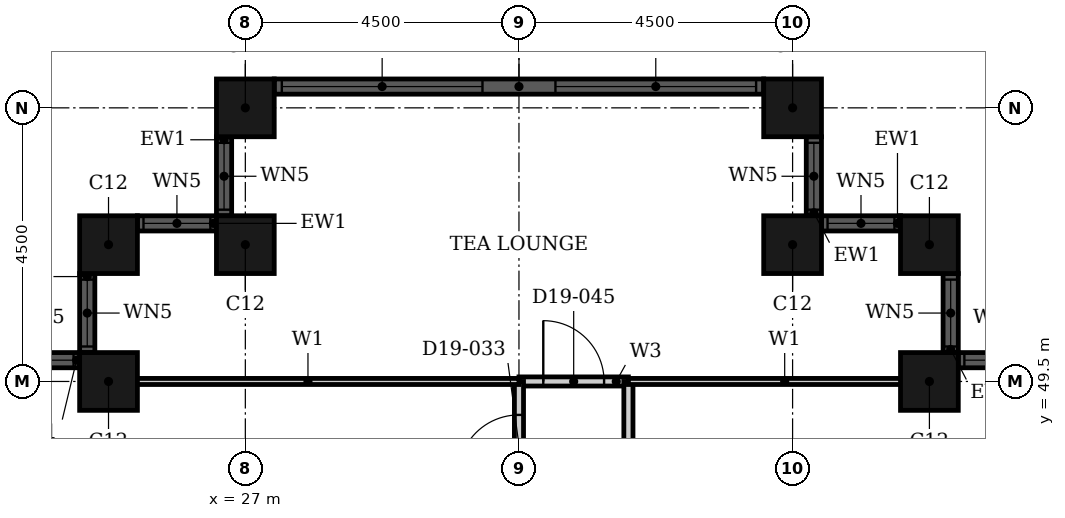
"""IFC4 building model, lengths in metres.
Left out: names, types, materials, properties, quantities, classifications, styles, units other than length and angle.
Written with IfcOpenShell. Run it as: python <this file> out.ifc"""

import sys

from ifc_helpers import new_model, si_unit, direction, frame, frame_2d, origin, origin_2d, place, context, subcontext, project, spatial, rectangle, hollow_rectangle, extrude, element, fill, save


model = new_model("IFC4")
c1 = context("Model", 3, precision=1e-05, world=origin(), true_north=direction((0.0, 1.0)))
c2 = subcontext(c1, "Body", "Model", "MODEL_VIEW")
j1 = project(units=[si_unit("LENGTHUNIT", "METRE"), si_unit("PLANEANGLEUNIT", "RADIAN")], contexts=[c1])
p1 = place(None, origin())
s1 = spatial("IfcSite", under=j1, at=p1, CompositionType="ELEMENT")
p2 = place(p1, origin())
s2 = spatial("IfcBuilding", under=s1, at=p2, CompositionType="ELEMENT")
p3 = place(p2, frame((0.0, 0.0, 81.6)))
s3 = spatial("IfcBuildingStorey", under=s2, at=p3, CompositionType="ELEMENT", Elevation=81.6)
for number, where, z_axis, x_axis in (
    (1, (38.25, 49.5, 0.0), (0.0, 0.0, 1.0), (1.0, 0.0, 0.0)),
    (2, (38.25, 51.75, 0.0), (0.0, 0.0, 1.0), (1.0, 0.0, 0.0)),
    (3, (36.0, 51.75, 0.0), (0.0, 0.0, 1.0), (1.0, 0.0, 0.0)),
    (4, (36.0, 54.0, 0.0), (0.0, 0.0, 1.0), (1.0, 0.0, 0.0)),
    (5, (27.0, 54.0, 0.0), (0.0, 0.0, 1.0), (1.0, 0.0, 0.0)),
    (6, (27.0, 51.75, 0.0), (0.0, 0.0, 1.0), (1.0, 0.0, 0.0)),
    (7, (24.75, 51.75, 0.0), (0.0, 0.0, 1.0), (1.0, 0.0, 0.0)),
    (8, (24.75, 49.5, 0.0), (0.0, 0.0, 1.0), (1.0, 0.0, 0.0)),
):
    element("IfcColumn", number, at=place(p3, frame(where, z_axis=z_axis, x_axis=x_axis)), inside=s3, PredefinedType="COLUMN", context=c2, shape_type="SweptSolid", body=[
        extrude(hollow_rectangle(XDim=0.95, YDim=0.95, WallThickness=0.03, at=origin_2d()), origin(), (0.0, 0.0, 1.0), 3.6),
    ])
p4 = place(p3, frame((40.025, 49.85, 0.0), z_axis=(0.0, 0.0, 1.0), x_axis=(-1.0, 0.0, 0.0)))
e9 = element("IfcWall", 9, at=p4, inside=s3, PredefinedType="SOLIDWALL", context=c2, shape_type="SweptSolid", body=[
    extrude(rectangle(XDim=1.3, YDim=0.25, at=frame_2d((0.65, 0.0))), origin(), (0.0, 0.0, 1.0), 3.6),
])
p5 = place(p4, frame((0.1, 0.0, 0.9)))
e10 = element("IfcOpeningElement", 10, at=p5, cuts=e9, PredefinedType="OPENING", context=c2, shape_type="SweptSolid", body=[
    extrude(rectangle(XDim=1.1, YDim=2.08, at=frame_2d((0.55, 1.04))), frame((0.0, 0.135, 0.0), z_axis=(0.0, -1.0, 0.0), x_axis=(1.0, 0.0, 0.0)), (0.0, 0.0, 1.0), 0.27),
])
p6 = place(p3, frame((38.6, 49.975, 0.0), z_axis=(0.0, 0.0, 1.0), x_axis=(0.0, 1.0, 0.0)))
e11 = element("IfcWall", 11, at=p6, inside=s3, PredefinedType="SOLIDWALL", context=c2, shape_type="SweptSolid", body=[
    extrude(rectangle(XDim=1.3, YDim=0.25, at=frame_2d((0.65, 0.0))), origin(), (0.0, 0.0, 1.0), 3.6),
])
p7 = place(p6, frame((0.1, 0.0, 0.9)))
e12 = element("IfcOpeningElement", 12, at=p7, cuts=e11, PredefinedType="OPENING", context=c2, shape_type="SweptSolid", body=[
    extrude(rectangle(XDim=1.1, YDim=2.08, at=frame_2d((0.55, 1.04))), frame((0.0, 0.135, 0.0), z_axis=(0.0, -1.0, 0.0), x_axis=(1.0, 0.0, 0.0)), (0.0, 0.0, 1.0), 0.27),
])
p8 = place(p3, frame((37.775, 52.1, 0.0), z_axis=(0.0, 0.0, 1.0), x_axis=(-1.0, 0.0, 0.0)))
e13 = element("IfcWall", 13, at=p8, inside=s3, PredefinedType="SOLIDWALL", context=c2, shape_type="SweptSolid", body=[
    extrude(rectangle(XDim=1.3, YDim=0.25, at=frame_2d((0.65, 0.0))), origin(), (0.0, 0.0, 1.0), 3.6),
])
p9 = place(p8, frame((0.1, 0.0, 0.9)))
e14 = element("IfcOpeningElement", 14, at=p9, cuts=e13, PredefinedType="OPENING", context=c2, shape_type="SweptSolid", body=[
    extrude(rectangle(XDim=1.1, YDim=2.08, at=frame_2d((0.55, 1.04))), frame((0.0, 0.135, 0.0), z_axis=(0.0, -1.0, 0.0), x_axis=(1.0, 0.0, 0.0)), (0.0, 0.0, 1.0), 0.27),
])
p10 = place(p3, frame((36.35, 52.225, 0.0), z_axis=(0.0, 0.0, 1.0), x_axis=(0.0, 1.0, 0.0)))
e15 = element("IfcWall", 15, at=p10, inside=s3, PredefinedType="SOLIDWALL", context=c2, shape_type="SweptSolid", body=[
    extrude(rectangle(XDim=1.3, YDim=0.25, at=frame_2d((0.65, 0.0))), origin(), (0.0, 0.0, 1.0), 3.6),
])
p11 = place(p10, frame((0.1, 0.0, 0.9)))
e16 = element("IfcOpeningElement", 16, at=p11, cuts=e15, PredefinedType="OPENING", context=c2, shape_type="SweptSolid", body=[
    extrude(rectangle(XDim=1.1, YDim=2.08, at=frame_2d((0.55, 1.04))), frame((0.0, 0.135, 0.0), z_axis=(0.0, -1.0, 0.0), x_axis=(1.0, 0.0, 0.0)), (0.0, 0.0, 1.0), 0.27),
])
p12 = place(p3, frame((35.525, 54.35, 0.0), z_axis=(0.0, 0.0, 1.0), x_axis=(-1.0, 0.0, 0.0)))
e17 = element("IfcWall", 17, at=p12, inside=s3, PredefinedType="SOLIDWALL", context=c2, shape_type="SweptSolid", body=[
    extrude(rectangle(XDim=8.05, YDim=0.25, at=frame_2d((4.025, 0.0))), origin(), (0.0, 0.0, 1.0), 3.6),
])
p13 = place(p12, frame((0.125, 0.0, 0.9)))
e18 = element("IfcOpeningElement", 18, at=p13, cuts=e17, PredefinedType="OPENING", context=c2, shape_type="SweptSolid", body=[
    extrude(rectangle(XDim=3.3, YDim=2.08, at=frame_2d((1.65, 1.04))), frame((0.0, 0.135, 0.0), z_axis=(0.0, -1.0, 0.0), x_axis=(1.0, 0.0, 0.0)), (0.0, 0.0, 1.0), 0.27),
])
p14 = place(p12, frame((4.625, 0.0, 0.9)))
e19 = element("IfcOpeningElement", 19, at=p14, cuts=e17, PredefinedType="OPENING", context=c2, shape_type="SweptSolid", body=[
    extrude(rectangle(XDim=3.3, YDim=2.08, at=frame_2d((1.65, 1.04))), frame((0.0, 0.135, 0.0), z_axis=(0.0, -1.0, 0.0), x_axis=(1.0, 0.0, 0.0)), (0.0, 0.0, 1.0), 0.27),
])
p15 = place(p3, frame((26.65, 53.525, 0.0), z_axis=(0.0, 0.0, 1.0), x_axis=(0.0, -1.0, 0.0)))
e20 = element("IfcWall", 20, at=p15, inside=s3, PredefinedType="SOLIDWALL", context=c2, shape_type="SweptSolid", body=[
    extrude(rectangle(XDim=1.3, YDim=0.25, at=frame_2d((0.65, 0.0))), origin(), (0.0, 0.0, 1.0), 3.6),
])
p16 = place(p15, frame((0.1, 0.0, 0.9)))
e21 = element("IfcOpeningElement", 21, at=p16, cuts=e20, PredefinedType="OPENING", context=c2, shape_type="SweptSolid", body=[
    extrude(rectangle(XDim=1.1, YDim=2.08, at=frame_2d((0.55, 1.04))), frame((0.0, 0.135, 0.0), z_axis=(0.0, -1.0, 0.0), x_axis=(1.0, 0.0, 0.0)), (0.0, 0.0, 1.0), 0.27),
])
p17 = place(p3, frame((26.525, 52.1, 0.0), z_axis=(0.0, 0.0, 1.0), x_axis=(-1.0, 0.0, 0.0)))
e22 = element("IfcWall", 22, at=p17, inside=s3, PredefinedType="SOLIDWALL", context=c2, shape_type="SweptSolid", body=[
    extrude(rectangle(XDim=1.3, YDim=0.25, at=frame_2d((0.65, 0.0))), origin(), (0.0, 0.0, 1.0), 3.6),
])
p18 = place(p17, frame((0.1, 0.0, 0.9)))
e23 = element("IfcOpeningElement", 23, at=p18, cuts=e22, PredefinedType="OPENING", context=c2, shape_type="SweptSolid", body=[
    extrude(rectangle(XDim=1.1, YDim=2.08, at=frame_2d((0.55, 1.04))), frame((0.0, 0.135, 0.0), z_axis=(0.0, -1.0, 0.0), x_axis=(1.0, 0.0, 0.0)), (0.0, 0.0, 1.0), 0.27),
])
p19 = place(p3, frame((24.4, 51.275, 0.0), z_axis=(0.0, 0.0, 1.0), x_axis=(0.0, -1.0, 0.0)))
e24 = element("IfcWall", 24, at=p19, inside=s3, PredefinedType="SOLIDWALL", context=c2, shape_type="SweptSolid", body=[
    extrude(rectangle(XDim=1.3, YDim=0.25, at=frame_2d((0.65, 0.0))), origin(), (0.0, 0.0, 1.0), 3.6),
])
p20 = place(p19, frame((0.1, 0.0, 0.9)))
e25 = element("IfcOpeningElement", 25, at=p20, cuts=e24, PredefinedType="OPENING", context=c2, shape_type="SweptSolid", body=[
    extrude(rectangle(XDim=1.1, YDim=2.08, at=frame_2d((0.55, 1.04))), frame((0.0, 0.135, 0.0), z_axis=(0.0, -1.0, 0.0), x_axis=(1.0, 0.0, 0.0)), (0.0, 0.0, 1.0), 0.27),
])
p21 = place(p3, frame((24.275, 49.85, 0.0), z_axis=(0.0, 0.0, 1.0), x_axis=(-1.0, 0.0, 0.0)))
e26 = element("IfcWall", 26, at=p21, inside=s3, PredefinedType="SOLIDWALL", context=c2, shape_type="SweptSolid", body=[
    extrude(rectangle(XDim=1.3, YDim=0.25, at=frame_2d((0.65, 0.0))), origin(), (0.0, 0.0, 1.0), 3.6),
])
p22 = place(p21, frame((0.1, 0.0, 0.9)))
e27 = element("IfcOpeningElement", 27, at=p22, cuts=e26, PredefinedType="OPENING", context=c2, shape_type="SweptSolid", body=[
    extrude(rectangle(XDim=1.1, YDim=2.08, at=frame_2d((0.55, 1.04))), frame((0.0, 0.135, 0.0), z_axis=(0.0, -1.0, 0.0), x_axis=(1.0, 0.0, 0.0)), (0.0, 0.0, 1.0), 0.27),
])
p23 = place(p3, frame((31.5, 49.5, 0.0), z_axis=(0.0, 0.0, 1.0), x_axis=(1.0, 0.0, 0.0)))
e28 = element("IfcWall", 28, at=p23, inside=s3, PredefinedType="PARTITIONING", context=c2, shape_type="SweptSolid", body=[
    extrude(rectangle(XDim=1.8, YDim=0.15, at=frame_2d((0.9, 0.0))), origin(), (0.0, 0.0, 1.0), 3.3),
])
p24 = place(p23, frame((0.4, 0.0, 0.0)))
e29 = element("IfcOpeningElement", 29, at=p24, cuts=e28, PredefinedType="OPENING", context=c2, shape_type="SweptSolid", body=[
    extrude(rectangle(XDim=1.0, YDim=2.1, at=frame_2d((0.5, 1.05))), frame((0.0, 0.085, 0.0), z_axis=(0.0, -1.0, 0.0), x_axis=(1.0, 0.0, 0.0)), (0.0, 0.0, 1.0), 0.17),
])
p25 = place(p3, frame((31.5, 33.3, 0.0), z_axis=(0.0, 0.0, 1.0), x_axis=(0.0, 1.0, 0.0)))
e30 = element("IfcWall", 30, at=p25, inside=s3, PredefinedType="PARTITIONING", context=c2, shape_type="SweptSolid", body=[
    extrude(rectangle(XDim=16.2, YDim=0.15, at=frame_2d((8.1, 0.0))), origin(), (0.0, 0.0, 1.0), 2.58),
])
p26 = place(p25, frame((10.15, 0.0, 0.0)))
e31 = element("IfcOpeningElement", 31, at=p26, cuts=e30, PredefinedType="OPENING", context=c2, shape_type="SweptSolid", body=[
    extrude(rectangle(XDim=1.0, YDim=2.1, at=frame_2d((0.5, 1.05))), frame((0.0, 0.085, 0.0), z_axis=(0.0, -1.0, 0.0), x_axis=(1.0, 0.0, 0.0)), (0.0, 0.0, 1.0), 0.17),
])
p27 = place(p25, frame((14.65, 0.0, 0.0)))
e32 = element("IfcOpeningElement", 32, at=p27, cuts=e30, PredefinedType="OPENING", context=c2, shape_type="SweptSolid", body=[
    extrude(rectangle(XDim=1.0, YDim=2.1, at=frame_2d((0.5, 1.05))), frame((0.0, 0.085, 0.0), z_axis=(0.0, -1.0, 0.0), x_axis=(1.0, 0.0, 0.0)), (0.0, 0.0, 1.0), 0.17),
])
p28 = place(p3, frame((33.3, 33.3, 0.0), z_axis=(0.0, 0.0, 1.0), x_axis=(0.0, 1.0, 0.0)))
e33 = element("IfcWall", 33, at=p28, inside=s3, PredefinedType="PARTITIONING", context=c2, shape_type="SweptSolid", body=[
    extrude(rectangle(XDim=16.2, YDim=0.15, at=frame_2d((8.1, 0.0))), origin(), (0.0, 0.0, 1.0), 3.3),
])
p29 = place(p28, frame((8.95, 0.0, 0.0)))
e34 = element("IfcOpeningElement", 34, at=p29, cuts=e33, PredefinedType="OPENING", context=c2, shape_type="SweptSolid", body=[
    extrude(rectangle(XDim=1.0, YDim=2.1, at=frame_2d((0.5, 1.05))), frame((0.0, 0.085, 0.0), z_axis=(0.0, -1.0, 0.0), x_axis=(1.0, 0.0, 0.0)), (0.0, 0.0, 1.0), 0.17),
])
p30 = place(p3, frame((24.56, 49.5, 0.0), z_axis=(0.0, 0.0, 1.0), x_axis=(1.0, 0.0, 0.0)))
e35 = element("IfcWall", 35, at=p30, inside=s3, PredefinedType="PARTITIONING", context=c2, shape_type="SweptSolid", body=[
    extrude(rectangle(XDim=6.94, YDim=0.1, at=frame_2d((3.47, 0.0))), origin(), (0.0, 0.0, 1.0), 3.3),
])
p31 = place(p3, frame((33.3, 49.5, 0.0), z_axis=(0.0, 0.0, 1.0), x_axis=(1.0, 0.0, 0.0)))
e36 = element("IfcWall", 36, at=p31, inside=s3, PredefinedType="PARTITIONING", context=c2, shape_type="SweptSolid", body=[
    extrude(rectangle(XDim=5.14, YDim=0.1, at=frame_2d((2.57, 0.0))), origin(), (0.0, 0.0, 1.0), 3.3),
])
p32 = place(p5, origin())
e37 = element("IfcWindow", 37, at=p32, inside=s3, PartitioningType="SINGLE_PANEL", PredefinedType="WINDOW", context=c2, shape_type="SweptSolid", body=[
    extrude(rectangle(XDim=1.1, YDim=2.08, at=frame_2d((0.55, 1.04))), frame((0.0, 0.03, 0.0), z_axis=(0.0, -1.0, 0.0), x_axis=(1.0, 0.0, 0.0)), (0.0, 0.0, 1.0), 0.06),
])
fill(e10, e37)
p33 = place(p7, origin())
e38 = element("IfcWindow", 38, at=p33, inside=s3, PartitioningType="SINGLE_PANEL", PredefinedType="WINDOW", context=c2, shape_type="SweptSolid", body=[
    extrude(rectangle(XDim=1.1, YDim=2.08, at=frame_2d((0.55, 1.04))), frame((0.0, 0.03, 0.0), z_axis=(0.0, -1.0, 0.0), x_axis=(1.0, 0.0, 0.0)), (0.0, 0.0, 1.0), 0.06),
])
fill(e12, e38)
p34 = place(p9, origin())
e39 = element("IfcWindow", 39, at=p34, inside=s3, PartitioningType="SINGLE_PANEL", PredefinedType="WINDOW", context=c2, shape_type="SweptSolid", body=[
    extrude(rectangle(XDim=1.1, YDim=2.08, at=frame_2d((0.55, 1.04))), frame((0.0, 0.03, 0.0), z_axis=(0.0, -1.0, 0.0), x_axis=(1.0, 0.0, 0.0)), (0.0, 0.0, 1.0), 0.06),
])
fill(e14, e39)
p35 = place(p11, origin())
e40 = element("IfcWindow", 40, at=p35, inside=s3, PartitioningType="SINGLE_PANEL", PredefinedType="WINDOW", context=c2, shape_type="SweptSolid", body=[
    extrude(rectangle(XDim=1.1, YDim=2.08, at=frame_2d((0.55, 1.04))), frame((0.0, 0.03, 0.0), z_axis=(0.0, -1.0, 0.0), x_axis=(1.0, 0.0, 0.0)), (0.0, 0.0, 1.0), 0.06),
])
fill(e16, e40)
p36 = place(p13, origin())
e41 = element("IfcWindow", 41, at=p36, inside=s3, PartitioningType="SINGLE_PANEL", PredefinedType="WINDOW", context=c2, shape_type="SweptSolid", body=[
    extrude(rectangle(XDim=3.3, YDim=2.08, at=frame_2d((1.65, 1.04))), frame((0.0, 0.03, 0.0), z_axis=(0.0, -1.0, 0.0), x_axis=(1.0, 0.0, 0.0)), (0.0, 0.0, 1.0), 0.06),
])
fill(e18, e41)
p37 = place(p14, origin())
e42 = element("IfcWindow", 42, at=p37, inside=s3, PartitioningType="SINGLE_PANEL", PredefinedType="WINDOW", context=c2, shape_type="SweptSolid", body=[
    extrude(rectangle(XDim=3.3, YDim=2.08, at=frame_2d((1.65, 1.04))), frame((0.0, 0.03, 0.0), z_axis=(0.0, -1.0, 0.0), x_axis=(1.0, 0.0, 0.0)), (0.0, 0.0, 1.0), 0.06),
])
fill(e19, e42)
p38 = place(p16, origin())
e43 = element("IfcWindow", 43, at=p38, inside=s3, PartitioningType="SINGLE_PANEL", PredefinedType="WINDOW", context=c2, shape_type="SweptSolid", body=[
    extrude(rectangle(XDim=1.1, YDim=2.08, at=frame_2d((0.55, 1.04))), frame((0.0, 0.03, 0.0), z_axis=(0.0, -1.0, 0.0), x_axis=(1.0, 0.0, 0.0)), (0.0, 0.0, 1.0), 0.06),
])
fill(e21, e43)
p39 = place(p18, origin())
e44 = element("IfcWindow", 44, at=p39, inside=s3, PartitioningType="SINGLE_PANEL", PredefinedType="WINDOW", context=c2, shape_type="SweptSolid", body=[
    extrude(rectangle(XDim=1.1, YDim=2.08, at=frame_2d((0.55, 1.04))), frame((0.0, 0.03, 0.0), z_axis=(0.0, -1.0, 0.0), x_axis=(1.0, 0.0, 0.0)), (0.0, 0.0, 1.0), 0.06),
])
fill(e23, e44)
p40 = place(p20, origin())
e45 = element("IfcWindow", 45, at=p40, inside=s3, PartitioningType="SINGLE_PANEL", PredefinedType="WINDOW", context=c2, shape_type="SweptSolid", body=[
    extrude(rectangle(XDim=1.1, YDim=2.08, at=frame_2d((0.55, 1.04))), frame((0.0, 0.03, 0.0), z_axis=(0.0, -1.0, 0.0), x_axis=(1.0, 0.0, 0.0)), (0.0, 0.0, 1.0), 0.06),
])
fill(e25, e45)
p41 = place(p22, origin())
e46 = element("IfcWindow", 46, at=p41, inside=s3, PartitioningType="SINGLE_PANEL", PredefinedType="WINDOW", context=c2, shape_type="SweptSolid", body=[
    extrude(rectangle(XDim=1.1, YDim=2.08, at=frame_2d((0.55, 1.04))), frame((0.0, 0.03, 0.0), z_axis=(0.0, -1.0, 0.0), x_axis=(1.0, 0.0, 0.0)), (0.0, 0.0, 1.0), 0.06),
])
fill(e27, e46)
p42 = place(p27, origin())
e47 = element("IfcDoor", 47, at=p42, inside=s3, OperationType="SINGLE_SWING_RIGHT", PredefinedType="DOOR", context=c2, shape_type="SweptSolid", body=[
    extrude(rectangle(XDim=1.0, YDim=2.1, at=frame_2d((0.5, 1.05))), frame((0.0, 0.025, 0.0), z_axis=(0.0, -1.0, 0.0), x_axis=(1.0, 0.0, 0.0)), (0.0, 0.0, 1.0), 0.05),
])
fill(e32, e47)
p43 = place(p24, origin())
e48 = element("IfcDoor", 48, at=p43, inside=s3, OperationType="SINGLE_SWING_LEFT", PredefinedType="DOOR", context=c2, shape_type="SweptSolid", body=[
    extrude(rectangle(XDim=1.0, YDim=2.1, at=frame_2d((0.5, 1.05))), frame((0.0, 0.025, 0.0), z_axis=(0.0, -1.0, 0.0), x_axis=(1.0, 0.0, 0.0)), (0.0, 0.0, 1.0), 0.05),
])
fill(e29, e48)
save(model, sys.argv[1])
